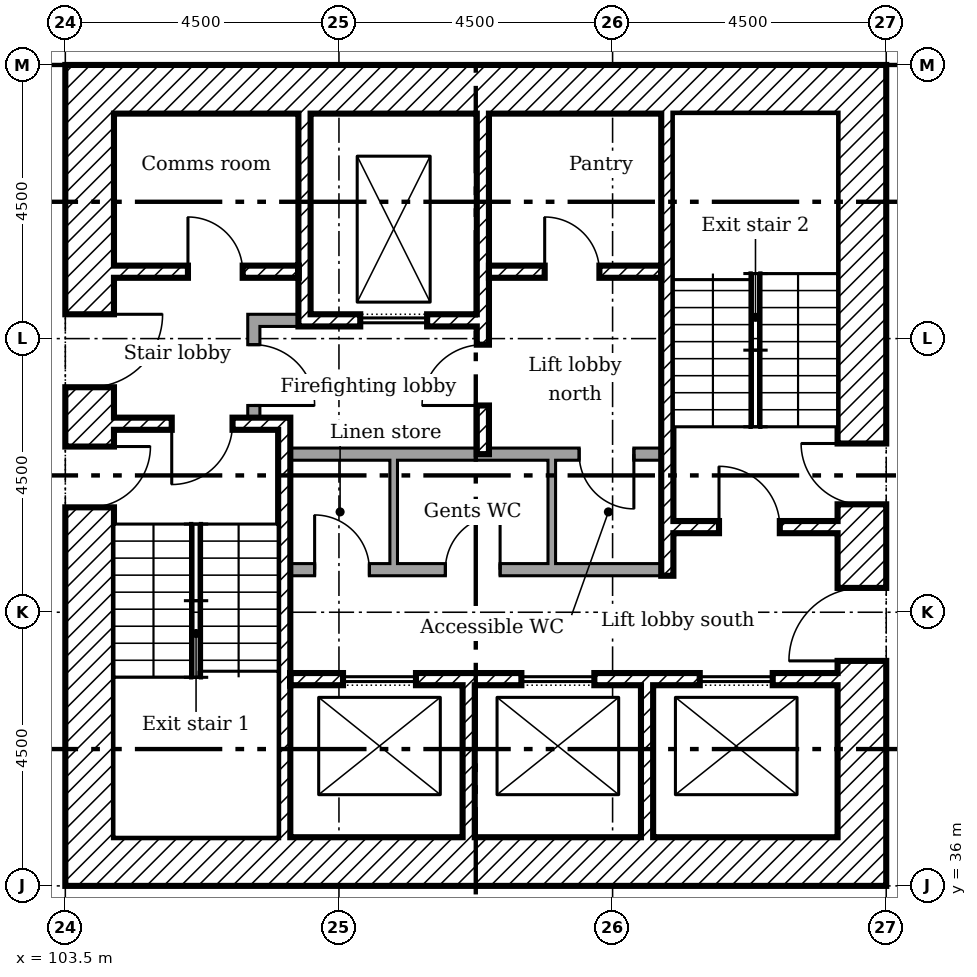
"""IFC4 building model, lengths in metres.
Left out: names, types, materials, properties, quantities, classifications, styles, units other than length and angle.
Written with IfcOpenShell. Run it as: python <this file> out.ifc"""

import sys

from ifc_helpers import new_model, si_unit, direction, frame, frame_2d, origin, place, context, subcontext, project, spatial, rectangle, extrude, element, fill, save


model = new_model("IFC4")
c1 = context("Model", 3, precision=1e-05, world=origin(), true_north=direction((0.0, 1.0)))
c2 = subcontext(c1, "Body", "Model", "MODEL_VIEW")
j1 = project(units=[si_unit("LENGTHUNIT", "METRE"), si_unit("PLANEANGLEUNIT", "RADIAN")], contexts=[c1])
p1 = place(None, origin())
s1 = spatial("IfcSite", under=j1, at=p1, CompositionType="ELEMENT")
p2 = place(p1, origin())
s2 = spatial("IfcBuilding", under=s1, at=p2, CompositionType="ELEMENT")
p3 = place(p2, frame((0.0, 0.0, 76.2)))
s3 = spatial("IfcBuildingStorey", under=s2, at=p3, CompositionType="ELEMENT", Elevation=76.2)
p4 = place(p3, frame((116.6, 36.0, 0.0), z_axis=(0.0, 0.0, 1.0), x_axis=(0.0, 1.0, 0.0)))
e1 = element("IfcWall", 1, at=p4, inside=s3, PredefinedType="SHEAR", context=c2, shape_type="SweptSolid", body=[
    extrude(rectangle(XDim=13.5, YDim=0.8, at=frame_2d((6.75, 0.0))), origin(), (0.0, 0.0, 1.0), 3.35),
])
p5 = place(p4, frame((3.7, 0.0, 0.0)))
e2 = element("IfcOpeningElement", 2, at=p5, cuts=e1, PredefinedType="OPENING", context=c2, shape_type="SweptSolid", body=[
    extrude(rectangle(XDim=1.2, YDim=2.1, at=frame_2d((0.6, 1.05))), frame((0.0, 0.41, 0.0), z_axis=(0.0, -1.0, 0.0), x_axis=(1.0, 0.0, 0.0)), (0.0, 0.0, 1.0), 0.82),
])
p6 = place(p4, frame((6.275, 0.0, 0.0)))
e3 = element("IfcOpeningElement", 3, at=p6, cuts=e1, PredefinedType="OPENING", context=c2, shape_type="SweptSolid", body=[
    extrude(rectangle(XDim=1.0, YDim=2.1, at=frame_2d((0.5, 1.05))), frame((0.0, 0.41, 0.0), z_axis=(0.0, -1.0, 0.0), x_axis=(1.0, 0.0, 0.0)), (0.0, 0.0, 1.0), 0.82),
])
for number, where in (
    (4, (104.3, 49.1, 0.0)),
    (5, (104.3, 36.4, 0.0)),
):
    element("IfcWall", number, at=place(p3, frame(where)), inside=s3, PredefinedType="SHEAR", context=c2, shape_type="SweptSolid", body=[
        extrude(rectangle(XDim=11.9, YDim=0.8, at=frame_2d((5.95, 0.0))), origin(), (0.0, 0.0, 1.0), 3.35),
    ])
p7 = place(p3, frame((103.9, 36.0, 0.0), z_axis=(0.0, 0.0, 1.0), x_axis=(0.0, 1.0, 0.0)))
e6 = element("IfcWall", 6, at=p7, inside=s3, PredefinedType="SHEAR", context=c2, shape_type="SweptSolid", body=[
    extrude(rectangle(XDim=13.5, YDim=0.8, at=frame_2d((6.75, 0.0))), origin(), (0.0, 0.0, 1.0), 3.35),
])
p8 = place(p7, frame((8.2, 0.0, 0.0)))
e7 = element("IfcOpeningElement", 7, at=p8, cuts=e6, PredefinedType="OPENING", context=c2, shape_type="SweptSolid", body=[
    extrude(rectangle(XDim=1.2, YDim=2.1, at=frame_2d((0.6, 1.05))), frame((0.0, 0.41, 0.0), z_axis=(0.0, -1.0, 0.0), x_axis=(1.0, 0.0, 0.0)), (0.0, 0.0, 1.0), 0.82),
])
p9 = place(p7, frame((6.225, 0.0, 0.0)))
e8 = element("IfcOpeningElement", 8, at=p9, cuts=e6, PredefinedType="OPENING", context=c2, shape_type="SweptSolid", body=[
    extrude(rectangle(XDim=1.0, YDim=2.1, at=frame_2d((0.5, 1.05))), frame((0.0, 0.41, 0.0), z_axis=(0.0, -1.0, 0.0), x_axis=(1.0, 0.0, 0.0)), (0.0, 0.0, 1.0), 0.82),
])
p10 = place(p3, frame((107.433, 48.7, 0.0), z_axis=(0.0, 0.0, 1.0), x_axis=(0.0, -1.0, 0.0)))
e9 = element("IfcWall", 9, at=p10, inside=s3, PredefinedType="SHEAR", context=c2, shape_type="SweptSolid", body=[
    extrude(rectangle(XDim=3.5, YDim=0.2, at=frame_2d((1.75, 0.0))), origin(), (0.0, 0.0, 1.0), 3.35),
])
p11 = place(p3, frame((110.367, 48.7, 0.0), z_axis=(0.0, 0.0, 1.0), x_axis=(0.0, -1.0, 0.0)))
e10 = element("IfcWall", 10, at=p11, inside=s3, PredefinedType="SHEAR", context=c2, shape_type="SweptSolid", body=[
    extrude(rectangle(XDim=5.6, YDim=0.2, at=frame_2d((2.8, 0.0))), origin(), (0.0, 0.0, 1.0), 3.35),
])
p12 = place(p11, frame((3.8, 0.0, 0.0)))
e11 = element("IfcOpeningElement", 11, at=p12, cuts=e10, PredefinedType="OPENING", context=c2, shape_type="SweptSolid", body=[
    extrude(rectangle(XDim=1.0, YDim=2.1, at=frame_2d((0.5, 1.05))), frame((0.0, 0.11, 0.0), z_axis=(0.0, -1.0, 0.0), x_axis=(1.0, 0.0, 0.0)), (0.0, 0.0, 1.0), 0.22),
])
for number, where, z_axis, x_axis in (
    (12, (110.133, 36.8, 0.0), (0.0, 0.0, 1.0), (0.0, 1.0, 0.0)),
    (13, (113.067, 36.8, 0.0), (0.0, 0.0, 1.0), (0.0, 1.0, 0.0)),
):
    element("IfcWall", number, at=place(p3, frame(where, z_axis=z_axis, x_axis=x_axis)), inside=s3, PredefinedType="SHEAR", context=c2, shape_type="SweptSolid", body=[
        extrude(rectangle(XDim=2.5, YDim=0.2, at=frame_2d((1.25, 0.0))), origin(), (0.0, 0.0, 1.0), 3.35),
    ])
p13 = place(p3, frame((106.5, 45.3, 0.0)))
e14 = element("IfcWall", 14, at=p13, inside=s3, PredefinedType="PARTITIONING", context=c2, shape_type="SweptSolid", body=[
    extrude(rectangle(XDim=0.833, YDim=0.2, at=frame_2d((0.417, 0.0))), origin(), (0.0, 0.0, 1.0), 3.35),
])
p14 = place(p3, frame((106.6, 43.7, 0.0), z_axis=(0.0, 0.0, 1.0), x_axis=(0.0, 1.0, 0.0)))
e15 = element("IfcWall", 15, at=p14, inside=s3, PredefinedType="PARTITIONING", context=c2, shape_type="SweptSolid", body=[
    extrude(rectangle(XDim=1.5, YDim=0.2, at=frame_2d((0.75, 0.0))), origin(), (0.0, 0.0, 1.0), 3.35),
])
p15 = place(p14, frame((0.2, 0.0, 0.0)))
e16 = element("IfcOpeningElement", 16, at=p15, cuts=e15, PredefinedType="OPENING", context=c2, shape_type="SweptSolid", body=[
    extrude(rectangle(XDim=1.0, YDim=2.1, at=frame_2d((0.5, 1.05))), frame((0.0, 0.11, 0.0), z_axis=(0.0, -1.0, 0.0), x_axis=(1.0, 0.0, 0.0)), (0.0, 0.0, 1.0), 0.22),
])
p16 = place(p3, frame((104.3, 46.1, 0.0)))
e17 = element("IfcWall", 17, at=p16, inside=s3, PredefinedType="SHEAR", context=c2, shape_type="SweptSolid", body=[
    extrude(rectangle(XDim=3.033, YDim=0.2, at=frame_2d((1.517, 0.0))), origin(), (0.0, 0.0, 1.0), 3.35),
])
p17 = place(p16, frame((1.217, 0.0, 0.0)))
e18 = element("IfcOpeningElement", 18, at=p17, cuts=e17, PredefinedType="OPENING", context=c2, shape_type="SweptSolid", body=[
    extrude(rectangle(XDim=0.9, YDim=2.1, at=frame_2d((0.45, 1.05))), frame((0.0, 0.11, 0.0), z_axis=(0.0, -1.0, 0.0), x_axis=(1.0, 0.0, 0.0)), (0.0, 0.0, 1.0), 0.22),
])
p18 = place(p3, frame((110.467, 46.1, 0.0)))
e19 = element("IfcWall", 19, at=p18, inside=s3, PredefinedType="SHEAR", context=c2, shape_type="SweptSolid", body=[
    extrude(rectangle(XDim=2.833, YDim=0.2, at=frame_2d((1.417, 0.0))), origin(), (0.0, 0.0, 1.0), 3.35),
])
p19 = place(p18, frame((0.917, 0.0, 0.0)))
e20 = element("IfcOpeningElement", 20, at=p19, cuts=e19, PredefinedType="OPENING", context=c2, shape_type="SweptSolid", body=[
    extrude(rectangle(XDim=0.9, YDim=2.1, at=frame_2d((0.45, 1.05))), frame((0.0, 0.11, 0.0), z_axis=(0.0, -1.0, 0.0), x_axis=(1.0, 0.0, 0.0)), (0.0, 0.0, 1.0), 0.22),
])
p20 = place(p3, frame((107.533, 45.3, 0.0)))
e21 = element("IfcWall", 21, at=p20, inside=s3, PredefinedType="SHEAR", context=c2, shape_type="SweptSolid", body=[
    extrude(rectangle(XDim=2.733, YDim=0.2, at=frame_2d((1.367, 0.0))), origin(), (0.0, 0.0, 1.0), 3.35),
])
p21 = place(p20, frame((0.817, 0.0, 0.0)))
e22 = element("IfcOpeningElement", 22, at=p21, cuts=e21, PredefinedType="OPENING", context=c2, shape_type="SweptSolid", body=[
    extrude(rectangle(XDim=1.1, YDim=2.1, at=frame_2d((0.55, 1.05))), frame((0.0, 0.11, 0.0), z_axis=(0.0, -1.0, 0.0), x_axis=(1.0, 0.0, 0.0)), (0.0, 0.0, 1.0), 0.22),
])
p22 = place(p3, frame((107.2, 39.4, 0.0)))
e23 = element("IfcWall", 23, at=p22, inside=s3, PredefinedType="SHEAR", context=c2, shape_type="SweptSolid", body=[
    extrude(rectangle(XDim=9.0, YDim=0.2, at=frame_2d((4.5, 0.0))), origin(), (0.0, 0.0, 1.0), 3.35),
])
p23 = place(p22, frame((0.867, 0.0, 0.0)))
e24 = element("IfcOpeningElement", 24, at=p23, cuts=e23, PredefinedType="OPENING", context=c2, shape_type="SweptSolid", body=[
    extrude(rectangle(XDim=1.2, YDim=2.1, at=frame_2d((0.6, 1.05))), frame((0.0, 0.11, 0.0), z_axis=(0.0, -1.0, 0.0), x_axis=(1.0, 0.0, 0.0)), (0.0, 0.0, 1.0), 0.22),
])
p24 = place(p22, frame((3.8, 0.0, 0.0)))
e25 = element("IfcOpeningElement", 25, at=p24, cuts=e23, PredefinedType="OPENING", context=c2, shape_type="SweptSolid", body=[
    extrude(rectangle(XDim=1.2, YDim=2.1, at=frame_2d((0.6, 1.05))), frame((0.0, 0.11, 0.0), z_axis=(0.0, -1.0, 0.0), x_axis=(1.0, 0.0, 0.0)), (0.0, 0.0, 1.0), 0.22),
])
p25 = place(p22, frame((6.733, 0.0, 0.0)))
e26 = element("IfcOpeningElement", 26, at=p25, cuts=e23, PredefinedType="OPENING", context=c2, shape_type="SweptSolid", body=[
    extrude(rectangle(XDim=1.2, YDim=2.1, at=frame_2d((0.6, 1.05))), frame((0.0, 0.11, 0.0), z_axis=(0.0, -1.0, 0.0), x_axis=(1.0, 0.0, 0.0)), (0.0, 0.0, 1.0), 0.22),
])
p26 = place(p3, frame((107.1, 36.8, 0.0), z_axis=(0.0, 0.0, 1.0), x_axis=(0.0, 1.0, 0.0)))
e27 = element("IfcWall", 27, at=p26, inside=s3, PredefinedType="SHEAR", context=c2, shape_type="SweptSolid", body=[
    extrude(rectangle(XDim=6.9, YDim=0.2, at=frame_2d((3.45, 0.0))), origin(), (0.0, 0.0, 1.0), 3.35),
])
p27 = place(p3, frame((104.3, 43.6, 0.0)))
e28 = element("IfcWall", 28, at=p27, inside=s3, PredefinedType="SHEAR", context=c2, shape_type="SweptSolid", body=[
    extrude(rectangle(XDim=2.7, YDim=0.2, at=frame_2d((1.35, 0.0))), origin(), (0.0, 0.0, 1.0), 3.35),
])
p28 = place(p27, frame((0.95, 0.0, 0.0)))
e29 = element("IfcOpeningElement", 29, at=p28, cuts=e28, PredefinedType="OPENING", context=c2, shape_type="SweptSolid", body=[
    extrude(rectangle(XDim=1.0, YDim=2.1, at=frame_2d((0.5, 1.05))), frame((0.0, 0.11, 0.0), z_axis=(0.0, -1.0, 0.0), x_axis=(1.0, 0.0, 0.0)), (0.0, 0.0, 1.0), 0.22),
])
p29 = place(p3, frame((113.5, 41.9, 0.0)))
e30 = element("IfcWall", 30, at=p29, inside=s3, PredefinedType="SHEAR", context=c2, shape_type="SweptSolid", body=[
    extrude(rectangle(XDim=2.7, YDim=0.2, at=frame_2d((1.35, 0.0))), origin(), (0.0, 0.0, 1.0), 3.35),
])
p30 = place(p29, frame((0.75, 0.0, 0.0)))
e31 = element("IfcOpeningElement", 31, at=p30, cuts=e30, PredefinedType="OPENING", context=c2, shape_type="SweptSolid", body=[
    extrude(rectangle(XDim=1.0, YDim=2.1, at=frame_2d((0.5, 1.05))), frame((0.0, 0.11, 0.0), z_axis=(0.0, -1.0, 0.0), x_axis=(1.0, 0.0, 0.0)), (0.0, 0.0, 1.0), 0.22),
])
p31 = place(p3, frame((113.4, 41.1, 0.0), z_axis=(0.0, 0.0, 1.0), x_axis=(0.0, 1.0, 0.0)))
e32 = element("IfcWall", 32, at=p31, inside=s3, PredefinedType="SHEAR", context=c2, shape_type="SweptSolid", body=[
    extrude(rectangle(XDim=7.6, YDim=0.2, at=frame_2d((3.8, 0.0))), origin(), (0.0, 0.0, 1.0), 3.35),
])
p32 = place(p3, frame((107.2, 43.1, 0.0)))
e33 = element("IfcWall", 33, at=p32, inside=s3, PredefinedType="PARTITIONING", context=c2, shape_type="SweptSolid", body=[
    extrude(rectangle(XDim=6.1, YDim=0.2, at=frame_2d((3.05, 0.0))), origin(), (0.0, 0.0, 1.0), 3.35),
])
p33 = place(p32, frame((4.75, 0.0, 0.0)))
e34 = element("IfcOpeningElement", 34, at=p33, cuts=e33, PredefinedType="OPENING", context=c2, shape_type="SweptSolid", body=[
    extrude(rectangle(XDim=0.9, YDim=2.1, at=frame_2d((0.45, 1.05))), frame((0.0, 0.11, 0.0), z_axis=(0.0, -1.0, 0.0), x_axis=(1.0, 0.0, 0.0)), (0.0, 0.0, 1.0), 0.22),
])
p34 = place(p3, frame((107.2, 41.2, 0.0)))
e35 = element("IfcWall", 35, at=p34, inside=s3, PredefinedType="PARTITIONING", context=c2, shape_type="SweptSolid", body=[
    extrude(rectangle(XDim=6.1, YDim=0.2, at=frame_2d((3.05, 0.0))), origin(), (0.0, 0.0, 1.0), 3.35),
])
p35 = place(p34, frame((0.4, 0.0, 0.0)))
e36 = element("IfcOpeningElement", 36, at=p35, cuts=e35, PredefinedType="OPENING", context=c2, shape_type="SweptSolid", body=[
    extrude(rectangle(XDim=0.9, YDim=2.1, at=frame_2d((0.45, 1.05))), frame((0.0, 0.11, 0.0), z_axis=(0.0, -1.0, 0.0), x_axis=(1.0, 0.0, 0.0)), (0.0, 0.0, 1.0), 0.22),
])
p36 = place(p34, frame((2.55, 0.0, 0.0)))
e37 = element("IfcOpeningElement", 37, at=p36, cuts=e35, PredefinedType="OPENING", context=c2, shape_type="SweptSolid", body=[
    extrude(rectangle(XDim=0.9, YDim=2.1, at=frame_2d((0.45, 1.05))), frame((0.0, 0.11, 0.0), z_axis=(0.0, -1.0, 0.0), x_axis=(1.0, 0.0, 0.0)), (0.0, 0.0, 1.0), 0.22),
])
for number, where, z_axis, x_axis in (
    (38, (108.9, 41.3, 0.0), (0.0, 0.0, 1.0), (0.0, 1.0, 0.0)),
    (39, (111.5, 41.3, 0.0), (0.0, 0.0, 1.0), (0.0, 1.0, 0.0)),
):
    element("IfcWall", number, at=place(p3, frame(where, z_axis=z_axis, x_axis=x_axis)), inside=s3, PredefinedType="PARTITIONING", context=c2, shape_type="SweptSolid", body=[
        extrude(rectangle(XDim=1.7, YDim=0.125, at=frame_2d((0.85, 0.0))), origin(), (0.0, 0.0, 1.0), 3.35),
    ])
p37 = place(p8, frame((1.2, 0.0, 0.0), x_axis=(-1.0, 0.0, 0.0)))
e40 = element("IfcDoor", 40, at=p37, inside=s3, OperationType="SINGLE_SWING_RIGHT", PredefinedType="DOOR", context=c2, shape_type="SweptSolid", body=[
    extrude(rectangle(XDim=1.2, YDim=2.1, at=frame_2d((0.6, 1.05))), frame((0.0, 0.025, 0.0), z_axis=(0.0, -1.0, 0.0), x_axis=(1.0, 0.0, 0.0)), (0.0, 0.0, 1.0), 0.05),
])
fill(e7, e40)
p38 = place(p5, origin())
e41 = element("IfcDoor", 41, at=p38, inside=s3, OperationType="SINGLE_SWING_RIGHT", PredefinedType="DOOR", context=c2, shape_type="SweptSolid", body=[
    extrude(rectangle(XDim=1.2, YDim=2.1, at=frame_2d((0.6, 1.05))), frame((0.0, 0.025, 0.0), z_axis=(0.0, -1.0, 0.0), x_axis=(1.0, 0.0, 0.0)), (0.0, 0.0, 1.0), 0.05),
])
fill(e2, e41)
p39 = place(p28, frame((1.0, 0.0, 0.0), x_axis=(-1.0, 0.0, 0.0)))
e42 = element("IfcDoor", 42, at=p39, inside=s3, OperationType="SINGLE_SWING_LEFT", PredefinedType="DOOR", context=c2, shape_type="SweptSolid", body=[
    extrude(rectangle(XDim=1.0, YDim=2.1, at=frame_2d((0.5, 1.05))), frame((0.0, 0.025, 0.0), z_axis=(0.0, -1.0, 0.0), x_axis=(1.0, 0.0, 0.0)), (0.0, 0.0, 1.0), 0.05),
])
fill(e29, e42)
p40 = place(p9, frame((1.0, 0.0, 0.0), x_axis=(-1.0, 0.0, 0.0)))
e43 = element("IfcDoor", 43, at=p40, inside=s3, OperationType="SINGLE_SWING_RIGHT", PredefinedType="DOOR", context=c2, shape_type="SweptSolid", body=[
    extrude(rectangle(XDim=1.0, YDim=2.1, at=frame_2d((0.5, 1.05))), frame((0.0, 0.025, 0.0), z_axis=(0.0, -1.0, 0.0), x_axis=(1.0, 0.0, 0.0)), (0.0, 0.0, 1.0), 0.05),
])
fill(e8, e43)
p41 = place(p30, origin())
e44 = element("IfcDoor", 44, at=p41, inside=s3, OperationType="SINGLE_SWING_RIGHT", PredefinedType="DOOR", context=c2, shape_type="SweptSolid", body=[
    extrude(rectangle(XDim=1.0, YDim=2.1, at=frame_2d((0.5, 1.05))), frame((0.0, 0.025, 0.0), z_axis=(0.0, -1.0, 0.0), x_axis=(1.0, 0.0, 0.0)), (0.0, 0.0, 1.0), 0.05),
])
fill(e31, e44)
p42 = place(p6, origin())
e45 = element("IfcDoor", 45, at=p42, inside=s3, OperationType="SINGLE_SWING_LEFT", PredefinedType="DOOR", context=c2, shape_type="SweptSolid", body=[
    extrude(rectangle(XDim=1.0, YDim=2.1, at=frame_2d((0.5, 1.05))), frame((0.0, 0.025, 0.0), z_axis=(0.0, -1.0, 0.0), x_axis=(1.0, 0.0, 0.0)), (0.0, 0.0, 1.0), 0.05),
])
fill(e3, e45)
p43 = place(p12, frame((1.0, 0.0, 0.0), x_axis=(-1.0, 0.0, 0.0)))
e46 = element("IfcDoor", 46, at=p43, inside=s3, OperationType="SINGLE_SWING_RIGHT", PredefinedType="DOOR", context=c2, shape_type="SweptSolid", body=[
    extrude(rectangle(XDim=1.0, YDim=2.1, at=frame_2d((0.5, 1.05))), frame((0.0, 0.025, 0.0), z_axis=(0.0, -1.0, 0.0), x_axis=(1.0, 0.0, 0.0)), (0.0, 0.0, 1.0), 0.05),
])
fill(e11, e46)
p44 = place(p15, frame((1.0, 0.0, 0.0), x_axis=(-1.0, 0.0, 0.0)))
e47 = element("IfcDoor", 47, at=p44, inside=s3, OperationType="SINGLE_SWING_LEFT", PredefinedType="DOOR", context=c2, shape_type="SweptSolid", body=[
    extrude(rectangle(XDim=1.0, YDim=2.1, at=frame_2d((0.5, 1.05))), frame((0.0, 0.025, 0.0), z_axis=(0.0, -1.0, 0.0), x_axis=(1.0, 0.0, 0.0)), (0.0, 0.0, 1.0), 0.05),
])
fill(e16, e47)
p45 = place(p17, origin())
e48 = element("IfcDoor", 48, at=p45, inside=s3, OperationType="SINGLE_SWING_RIGHT", PredefinedType="DOOR", context=c2, shape_type="SweptSolid", body=[
    extrude(rectangle(XDim=0.9, YDim=2.1, at=frame_2d((0.45, 1.05))), frame((0.0, 0.025, 0.0), z_axis=(0.0, -1.0, 0.0), x_axis=(1.0, 0.0, 0.0)), (0.0, 0.0, 1.0), 0.05),
])
fill(e18, e48)
p46 = place(p19, origin())
e49 = element("IfcDoor", 49, at=p46, inside=s3, OperationType="SINGLE_SWING_RIGHT", PredefinedType="DOOR", context=c2, shape_type="SweptSolid", body=[
    extrude(rectangle(XDim=0.9, YDim=2.1, at=frame_2d((0.45, 1.05))), frame((0.0, 0.025, 0.0), z_axis=(0.0, -1.0, 0.0), x_axis=(1.0, 0.0, 0.0)), (0.0, 0.0, 1.0), 0.05),
])
fill(e20, e49)
p47 = place(p35, origin())
e50 = element("IfcDoor", 50, at=p47, inside=s3, OperationType="SINGLE_SWING_RIGHT", PredefinedType="DOOR", context=c2, shape_type="SweptSolid", body=[
    extrude(rectangle(XDim=0.9, YDim=2.1, at=frame_2d((0.45, 1.05))), frame((0.0, 0.025, 0.0), z_axis=(0.0, -1.0, 0.0), x_axis=(1.0, 0.0, 0.0)), (0.0, 0.0, 1.0), 0.05),
])
fill(e36, e50)
p48 = place(p36, origin())
e51 = element("IfcDoor", 51, at=p48, inside=s3, OperationType="SINGLE_SWING_LEFT", PredefinedType="DOOR", context=c2, shape_type="SweptSolid", body=[
    extrude(rectangle(XDim=0.9, YDim=2.1, at=frame_2d((0.45, 1.05))), frame((0.0, 0.025, 0.0), z_axis=(0.0, -1.0, 0.0), x_axis=(1.0, 0.0, 0.0)), (0.0, 0.0, 1.0), 0.05),
])
fill(e37, e51)
p49 = place(p33, frame((0.9, 0.0, 0.0), x_axis=(-1.0, 0.0, 0.0)))
e52 = element("IfcDoor", 52, at=p49, inside=s3, OperationType="SINGLE_SWING_RIGHT", PredefinedType="DOOR", context=c2, shape_type="SweptSolid", body=[
    extrude(rectangle(XDim=0.9, YDim=2.1, at=frame_2d((0.45, 1.05))), frame((0.0, 0.025, 0.0), z_axis=(0.0, -1.0, 0.0), x_axis=(1.0, 0.0, 0.0)), (0.0, 0.0, 1.0), 0.05),
])
fill(e34, e52)
p50 = place(p21, origin())
e53 = element("IfcDoor", 53, at=p50, inside=s3, OperationType="SLIDING_TO_LEFT", PredefinedType="DOOR", context=c2, shape_type="SweptSolid", body=[
    extrude(rectangle(XDim=1.1, YDim=2.1, at=frame_2d((0.55, 1.05))), frame((0.0, 0.025, 0.0), z_axis=(0.0, -1.0, 0.0), x_axis=(1.0, 0.0, 0.0)), (0.0, 0.0, 1.0), 0.05),
])
fill(e22, e53)
p51 = place(p23, origin())
e54 = element("IfcDoor", 54, at=p51, inside=s3, OperationType="SLIDING_TO_LEFT", PredefinedType="DOOR", context=c2, shape_type="SweptSolid", body=[
    extrude(rectangle(XDim=1.2, YDim=2.1, at=frame_2d((0.6, 1.05))), frame((0.0, 0.025, 0.0), z_axis=(0.0, -1.0, 0.0), x_axis=(1.0, 0.0, 0.0)), (0.0, 0.0, 1.0), 0.05),
])
fill(e24, e54)
p52 = place(p24, origin())
e55 = element("IfcDoor", 55, at=p52, inside=s3, OperationType="SLIDING_TO_LEFT", PredefinedType="DOOR", context=c2, shape_type="SweptSolid", body=[
    extrude(rectangle(XDim=1.2, YDim=2.1, at=frame_2d((0.6, 1.05))), frame((0.0, 0.025, 0.0), z_axis=(0.0, -1.0, 0.0), x_axis=(1.0, 0.0, 0.0)), (0.0, 0.0, 1.0), 0.05),
])
fill(e25, e55)
p53 = place(p25, origin())
e56 = element("IfcDoor", 56, at=p53, inside=s3, OperationType="SLIDING_TO_LEFT", PredefinedType="DOOR", context=c2, shape_type="SweptSolid", body=[
    extrude(rectangle(XDim=1.2, YDim=2.1, at=frame_2d((0.6, 1.05))), frame((0.0, 0.025, 0.0), z_axis=(0.0, -1.0, 0.0), x_axis=(1.0, 0.0, 0.0)), (0.0, 0.0, 1.0), 0.05),
])
fill(e26, e56)
save(model, sys.argv[1])
